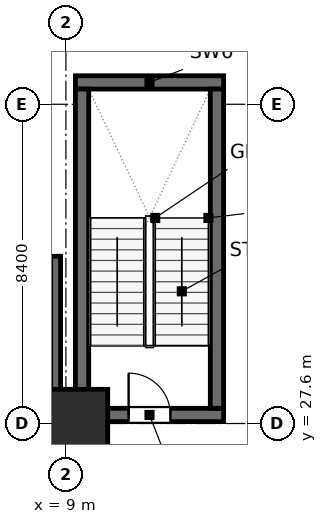
"""IFC4 building model, lengths in metres.
Left out: names, types, materials, properties, quantities, classifications, styles, units other than length and angle.
Written with IfcOpenShell. Run it as: python <this file> out.ifc"""

import sys

from ifc_helpers import new_model, si_unit, direction, frame, frame_2d, origin, origin_2d, place, context, subcontext, project, spatial, rectangle, extrude, element, fill, save


model = new_model("IFC4")
c1 = context("Model", 3, precision=1e-05, world=origin(), true_north=direction((0.0, 1.0)))
c2 = subcontext(c1, "Body", "Model", "MODEL_VIEW")
j1 = project(units=[si_unit("LENGTHUNIT", "METRE"), si_unit("PLANEANGLEUNIT", "RADIAN")], contexts=[c1])
p1 = place(None, origin())
s1 = spatial("IfcSite", under=j1, at=p1, CompositionType="ELEMENT")
p2 = place(p1, origin())
s2 = spatial("IfcBuilding", under=s1, at=p2, CompositionType="ELEMENT")
p3 = place(p2, frame((0.0, 0.0, -4.5)))
s3 = spatial("IfcBuildingStorey", under=s2, at=p3, CompositionType="ELEMENT", Elevation=-4.5)
p4 = place(p3, frame((8.73, 4.74, 0.0), z_axis=(0.0, 0.0, 1.0), x_axis=(0.0, 1.0, 0.0)))
e1 = element("IfcWall", 1, at=p4, inside=s3, PredefinedType="SHEAR", context=c2, shape_type="SweptSolid", body=[
    extrude(rectangle(XDim=27.26, YDim=0.26, at=frame_2d((13.63, 0.0))), origin(), (0.0, 0.0, 1.0), 4.18),
])
p5 = place(p3, frame((9.25, 27.825, 0.0), z_axis=(0.0, 0.0, 1.0), x_axis=(1.0, 0.0, 0.0)))
e2 = element("IfcWall", 2, at=p5, inside=s3, PredefinedType="SHEAR", context=c2, shape_type="SweptSolid", body=[
    extrude(rectangle(XDim=3.9, YDim=0.35, at=frame_2d((1.95, 0.0))), origin(), (0.0, 0.0, 1.0), 4.5),
])
p6 = place(p5, frame((1.4, 0.0, 0.0)))
e3 = element("IfcOpeningElement", 3, at=p6, cuts=e2, PredefinedType="OPENING", context=c2, shape_type="SweptSolid", body=[
    extrude(rectangle(XDim=1.1, YDim=2.05, at=frame_2d((0.55, 1.025))), frame((0.0, 0.185, 0.0), z_axis=(0.0, -1.0, 0.0), x_axis=(1.0, 0.0, 0.0)), (0.0, 0.0, 1.0), 0.37),
])
p7 = place(p3, frame((9.25, 36.575, 0.0), z_axis=(0.0, 0.0, 1.0), x_axis=(1.0, 0.0, 0.0)))
e4 = element("IfcWall", 4, at=p7, inside=s3, PredefinedType="SHEAR", context=c2, shape_type="SweptSolid", body=[
    extrude(rectangle(XDim=3.9, YDim=0.35, at=frame_2d((1.95, 0.0))), origin(), (0.0, 0.0, 1.0), 4.5),
])
for number, where, z_axis, x_axis in (
    (5, (9.425, 28.0, 0.0), (0.0, 0.0, 1.0), (0.0, 1.0, 0.0)),
    (6, (12.975, 28.0, 0.0), (0.0, 0.0, 1.0), (0.0, 1.0, 0.0)),
):
    element("IfcWall", number, at=place(p3, frame(where, z_axis=z_axis, x_axis=x_axis)), inside=s3, PredefinedType="SHEAR", context=c2, shape_type="SweptSolid", body=[
        extrude(rectangle(XDim=8.4, YDim=0.35, at=frame_2d((4.2, 0.0))), origin(), (0.0, 0.0, 1.0), 4.5),
    ])
p8 = place(p3, frame((9.2, 27.6, 0.0), z_axis=(0.0, 0.0, 1.0), x_axis=(1.0, 0.0, 0.0)))
e7 = element("IfcColumn", 7, at=p8, inside=s3, PredefinedType="COLUMN", context=c2, shape_type="SweptSolid", body=[
    extrude(rectangle(XDim=1.8, YDim=1.8, at=origin_2d()), origin(), (0.0, 0.0, 1.0), 4.5),
])
p9 = place(p6, origin())
e8 = element("IfcDoor", 8, at=p9, inside=s3, OperationType="SINGLE_SWING_LEFT", PredefinedType="DOOR", context=c2, shape_type="SweptSolid", body=[
    extrude(rectangle(XDim=1.1, YDim=2.05, at=frame_2d((0.55, 1.025))), frame((0.0, 0.025, 0.0), z_axis=(0.0, -1.0, 0.0), x_axis=(1.0, 0.0, 0.0)), (0.0, 0.0, 1.0), 0.05),
])
fill(e3, e8)
save(model, sys.argv[1])
